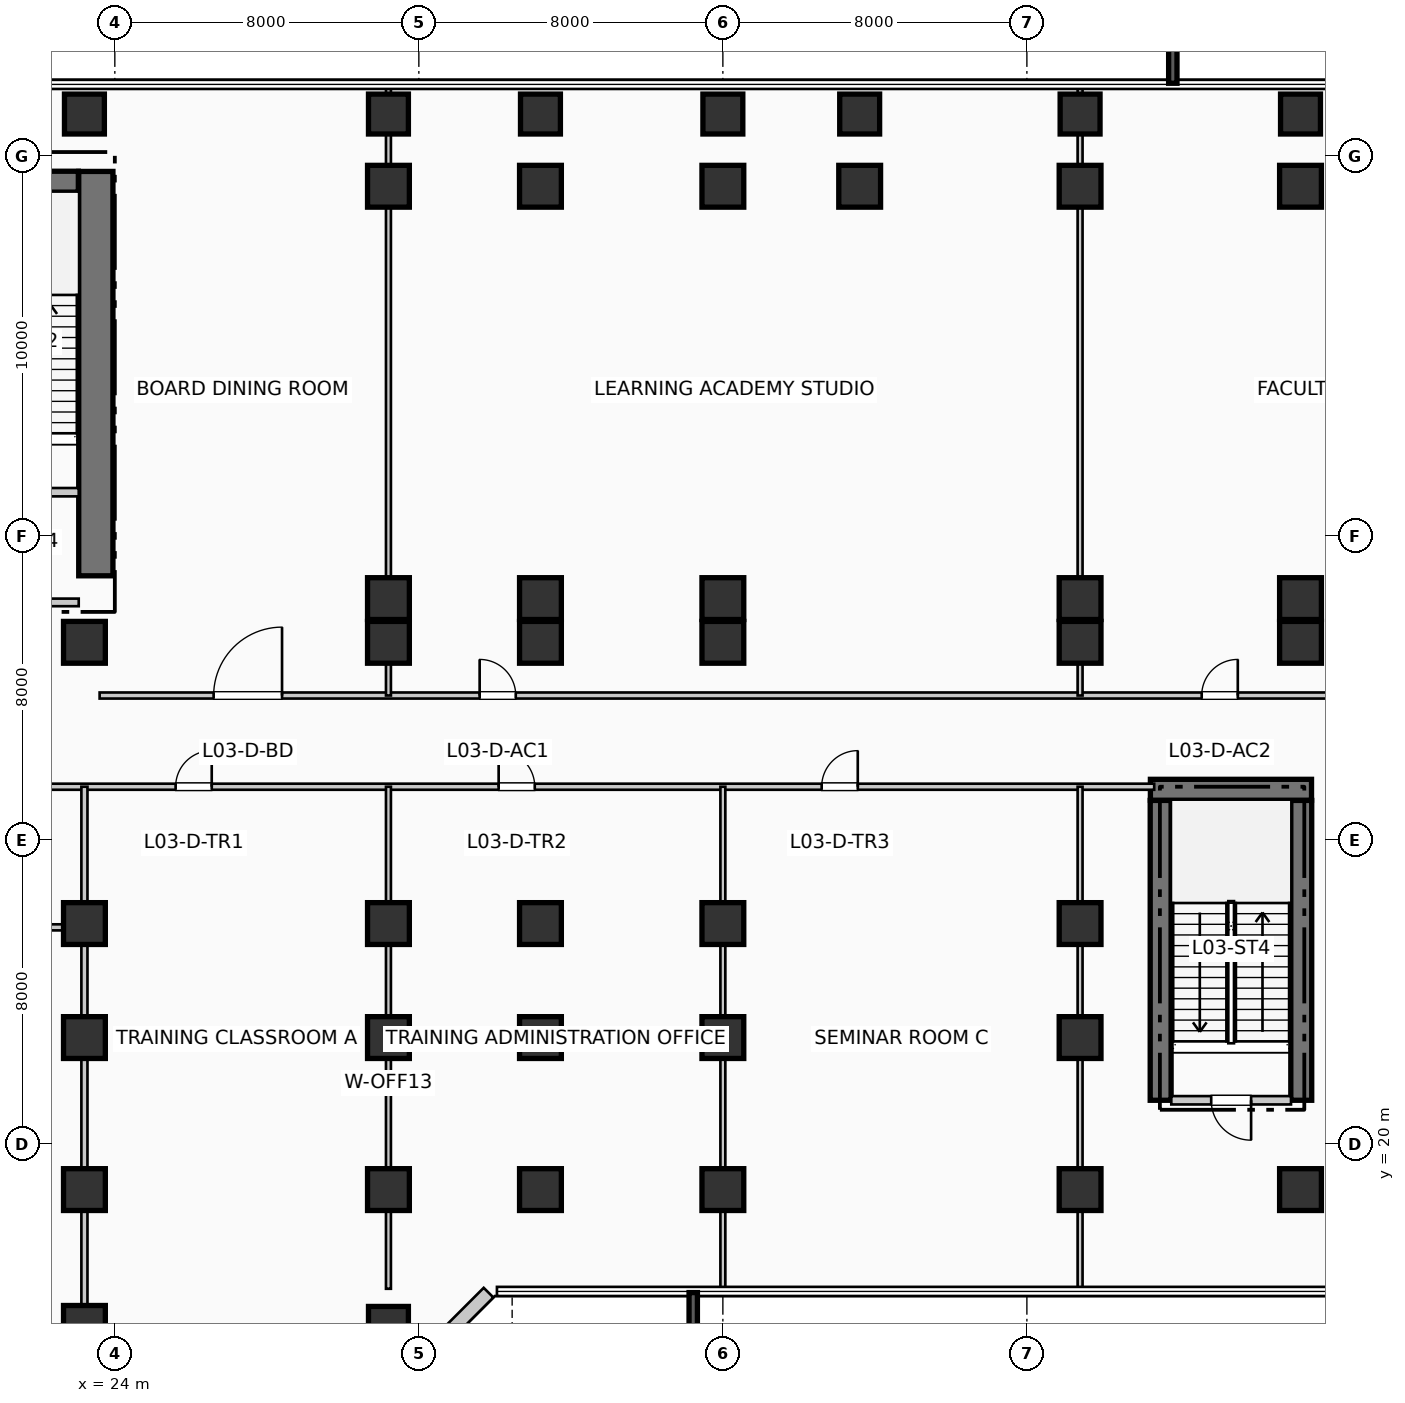
"""IFC4 building model, lengths in metres.
Left out: names, types, materials, properties, quantities, classifications, styles, units other than length and angle.
Written with IfcOpenShell. Run it as: python <this file> out.ifc"""

import sys

from ifc_helpers import new_model, si_unit, direction, frame, frame_2d, origin, origin_2d, place, context, subcontext, project, spatial, rectangle, extrude, element, fill, save


model = new_model("IFC4")
c1 = context("Model", 3, precision=1e-05, world=origin(), true_north=direction((0.0, 1.0)))
c2 = subcontext(c1, "Body", "Model", "MODEL_VIEW")
j1 = project(units=[si_unit("LENGTHUNIT", "METRE"), si_unit("PLANEANGLEUNIT", "RADIAN")], contexts=[c1])
p1 = place(None, origin())
s1 = spatial("IfcSite", under=j1, at=p1, CompositionType="ELEMENT")
p2 = place(p1, origin())
s2 = spatial("IfcBuilding", under=s1, at=p2, CompositionType="ELEMENT")
p3 = place(p2, frame((0.0, 0.0, 16.5)))
s3 = spatial("IfcBuildingStorey", under=s2, at=p3, CompositionType="ELEMENT", Elevation=16.5)
p4 = place(p3, frame((23.5, 34.95, 0.0), z_axis=(0.0, 0.0, 1.0), x_axis=(0.0, 1.0, 0.0)))
e1 = element("IfcWall", 1, at=p4, inside=s3, PredefinedType="SHEAR", context=c2, shape_type="SweptSolid", body=[
    extrude(rectangle(XDim=10.64, YDim=0.9, at=frame_2d((5.32, 0.0))), origin(), (0.0, 0.0, 1.0), 4.62),
])
p5 = place(p3, frame((19.35, 45.32, 0.0), z_axis=(0.0, 0.0, 1.0), x_axis=(1.0, 0.0, 0.0)))
e2 = element("IfcWall", 2, at=p5, inside=s3, PredefinedType="SHEAR", context=c2, shape_type="SweptSolid", body=[
    extrude(rectangle(XDim=3.69, YDim=0.55, at=frame_2d((1.845, 0.0))), origin(), (0.0, 0.0, 1.0), 4.62),
])
for number, where, z_axis, x_axis in (
    (3, (51.52, 21.15, 0.0), (0.0, 0.0, 1.0), (0.0, 1.0, 0.0)),
    (4, (55.22, 21.15, 0.0), (0.0, 0.0, 1.0), (0.0, 1.0, 0.0)),
):
    element("IfcWall", number, at=place(p3, frame(where, z_axis=z_axis, x_axis=x_axis)), inside=s3, PredefinedType="SHEAR", context=c2, shape_type="SweptSolid", body=[
        extrude(rectangle(XDim=7.89, YDim=0.55, at=frame_2d((3.945, 0.0))), origin(), (0.0, 0.0, 1.0), 4.62),
    ])
p6 = place(p3, frame((51.25, 29.32, 0.0), z_axis=(0.0, 0.0, 1.0), x_axis=(1.0, 0.0, 0.0)))
e5 = element("IfcWall", 5, at=p6, inside=s3, PredefinedType="SHEAR", context=c2, shape_type="SweptSolid", body=[
    extrude(rectangle(XDim=4.24, YDim=0.55, at=frame_2d((2.12, 0.0))), origin(), (0.0, 0.0, 1.0), 4.62),
])
for number, where, z_axis, x_axis in (
    (6, (23.2, 15.2, 0.0), (0.0, 0.0, 1.0), (1.0, 0.0, 0.0)),
    (7, (23.2, 18.8, 0.0), (0.0, 0.0, 1.0), (1.0, 0.0, 0.0)),
    (8, (23.2, 22.8, 0.0), (0.0, 0.0, 1.0), (1.0, 0.0, 0.0)),
    (9, (23.2, 25.8, 0.0), (0.0, 0.0, 1.0), (1.0, 0.0, 0.0)),
    (10, (23.2, 33.2, 0.0), (0.0, 0.0, 1.0), (1.0, 0.0, 0.0)),
):
    element("IfcColumn", number, at=place(p3, frame(where, z_axis=z_axis, x_axis=x_axis)), inside=s3, PredefinedType="COLUMN", context=c2, shape_type="SweptSolid", body=[
        extrude(rectangle(XDim=1.1, YDim=1.1, at=origin_2d()), origin(), (0.0, 0.0, 1.0), 4.62),
    ])
for number, where, z_axis, x_axis in (
    (11, (23.2, 47.1, 0.0), (0.0, 0.0, 1.0), (1.0, 0.0, 0.0)),
    (12, (31.2, 15.2, 0.0), (0.0, 0.0, 1.0), (1.0, 0.0, 0.0)),
):
    element("IfcColumn", number, at=place(p3, frame(where, z_axis=z_axis, x_axis=x_axis)), inside=s3, PredefinedType="COLUMN", context=c2, shape_type="SweptSolid", body=[
        extrude(rectangle(XDim=1.05, YDim=1.05, at=origin_2d()), origin(), (0.0, 0.0, 1.0), 4.62),
    ])
for number, where, z_axis, x_axis in (
    (13, (31.2, 18.8, 0.0), (0.0, 0.0, 1.0), (1.0, 0.0, 0.0)),
    (14, (31.2, 22.8, 0.0), (0.0, 0.0, 1.0), (1.0, 0.0, 0.0)),
    (15, (31.2, 25.8, 0.0), (0.0, 0.0, 1.0), (1.0, 0.0, 0.0)),
    (16, (31.2, 33.2, 0.0), (0.0, 0.0, 1.0), (1.0, 0.0, 0.0)),
    (17, (31.2, 34.35, 0.0), (0.0, 0.0, 1.0), (1.0, 0.0, 0.0)),
    (18, (31.2, 45.2, 0.0), (0.0, 0.0, 1.0), (1.0, 0.0, 0.0)),
):
    element("IfcColumn", number, at=place(p3, frame(where, z_axis=z_axis, x_axis=x_axis)), inside=s3, PredefinedType="COLUMN", context=c2, shape_type="SweptSolid", body=[
        extrude(rectangle(XDim=1.1, YDim=1.1, at=origin_2d()), origin(), (0.0, 0.0, 1.0), 4.62),
    ])
p7 = place(p3, frame((31.2, 47.1, 0.0), z_axis=(0.0, 0.0, 1.0), x_axis=(1.0, 0.0, 0.0)))
e19 = element("IfcColumn", 19, at=p7, inside=s3, PredefinedType="COLUMN", context=c2, shape_type="SweptSolid", body=[
    extrude(rectangle(XDim=1.05, YDim=1.05, at=origin_2d()), origin(), (0.0, 0.0, 1.0), 4.62),
])
for number, where, z_axis, x_axis in (
    (20, (35.2, 18.8, 0.0), (0.0, 0.0, 1.0), (1.0, 0.0, 0.0)),
    (21, (35.2, 22.8, 0.0), (0.0, 0.0, 1.0), (1.0, 0.0, 0.0)),
    (22, (35.2, 25.8, 0.0), (0.0, 0.0, 1.0), (1.0, 0.0, 0.0)),
    (23, (35.2, 33.2, 0.0), (0.0, 0.0, 1.0), (1.0, 0.0, 0.0)),
    (24, (35.2, 34.35, 0.0), (0.0, 0.0, 1.0), (1.0, 0.0, 0.0)),
    (25, (35.2, 45.2, 0.0), (0.0, 0.0, 1.0), (1.0, 0.0, 0.0)),
):
    element("IfcColumn", number, at=place(p3, frame(where, z_axis=z_axis, x_axis=x_axis)), inside=s3, PredefinedType="COLUMN", context=c2, shape_type="SweptSolid", body=[
        extrude(rectangle(XDim=1.1, YDim=1.1, at=origin_2d()), origin(), (0.0, 0.0, 1.0), 4.62),
    ])
p8 = place(p3, frame((35.2, 47.1, 0.0), z_axis=(0.0, 0.0, 1.0), x_axis=(1.0, 0.0, 0.0)))
e26 = element("IfcColumn", 26, at=p8, inside=s3, PredefinedType="COLUMN", context=c2, shape_type="SweptSolid", body=[
    extrude(rectangle(XDim=1.05, YDim=1.05, at=origin_2d()), origin(), (0.0, 0.0, 1.0), 4.62),
])
for number, where, z_axis, x_axis in (
    (27, (40.0, 18.8, 0.0), (0.0, 0.0, 1.0), (1.0, 0.0, 0.0)),
    (28, (40.0, 22.8, 0.0), (0.0, 0.0, 1.0), (1.0, 0.0, 0.0)),
    (29, (40.0, 25.8, 0.0), (0.0, 0.0, 1.0), (1.0, 0.0, 0.0)),
    (30, (40.0, 33.2, 0.0), (0.0, 0.0, 1.0), (1.0, 0.0, 0.0)),
    (31, (40.0, 34.35, 0.0), (0.0, 0.0, 1.0), (1.0, 0.0, 0.0)),
    (32, (40.0, 45.2, 0.0), (0.0, 0.0, 1.0), (1.0, 0.0, 0.0)),
):
    element("IfcColumn", number, at=place(p3, frame(where, z_axis=z_axis, x_axis=x_axis)), inside=s3, PredefinedType="COLUMN", context=c2, shape_type="SweptSolid", body=[
        extrude(rectangle(XDim=1.1, YDim=1.1, at=origin_2d()), origin(), (0.0, 0.0, 1.0), 4.62),
    ])
p9 = place(p3, frame((40.0, 47.1, 0.0), z_axis=(0.0, 0.0, 1.0), x_axis=(1.0, 0.0, 0.0)))
e33 = element("IfcColumn", 33, at=p9, inside=s3, PredefinedType="COLUMN", context=c2, shape_type="SweptSolid", body=[
    extrude(rectangle(XDim=1.05, YDim=1.05, at=origin_2d()), origin(), (0.0, 0.0, 1.0), 4.62),
])
p10 = place(p3, frame((43.6, 45.2, 0.0), z_axis=(0.0, 0.0, 1.0), x_axis=(1.0, 0.0, 0.0)))
e34 = element("IfcColumn", 34, at=p10, inside=s3, PredefinedType="COLUMN", context=c2, shape_type="SweptSolid", body=[
    extrude(rectangle(XDim=1.1, YDim=1.1, at=origin_2d()), origin(), (0.0, 0.0, 1.0), 4.62),
])
p11 = place(p3, frame((43.6, 47.1, 0.0), z_axis=(0.0, 0.0, 1.0), x_axis=(1.0, 0.0, 0.0)))
e35 = element("IfcColumn", 35, at=p11, inside=s3, PredefinedType="COLUMN", context=c2, shape_type="SweptSolid", body=[
    extrude(rectangle(XDim=1.05, YDim=1.05, at=origin_2d()), origin(), (0.0, 0.0, 1.0), 4.62),
])
for number, where, z_axis, x_axis in (
    (36, (49.4, 18.8, 0.0), (0.0, 0.0, 1.0), (1.0, 0.0, 0.0)),
    (37, (49.4, 22.8, 0.0), (0.0, 0.0, 1.0), (1.0, 0.0, 0.0)),
    (38, (49.4, 25.8, 0.0), (0.0, 0.0, 1.0), (1.0, 0.0, 0.0)),
    (39, (49.4, 33.2, 0.0), (0.0, 0.0, 1.0), (1.0, 0.0, 0.0)),
    (40, (49.4, 34.35, 0.0), (0.0, 0.0, 1.0), (1.0, 0.0, 0.0)),
    (41, (49.4, 45.2, 0.0), (0.0, 0.0, 1.0), (1.0, 0.0, 0.0)),
):
    element("IfcColumn", number, at=place(p3, frame(where, z_axis=z_axis, x_axis=x_axis)), inside=s3, PredefinedType="COLUMN", context=c2, shape_type="SweptSolid", body=[
        extrude(rectangle(XDim=1.1, YDim=1.1, at=origin_2d()), origin(), (0.0, 0.0, 1.0), 4.62),
    ])
p12 = place(p3, frame((49.4, 47.1, 0.0), z_axis=(0.0, 0.0, 1.0), x_axis=(1.0, 0.0, 0.0)))
e42 = element("IfcColumn", 42, at=p12, inside=s3, PredefinedType="COLUMN", context=c2, shape_type="SweptSolid", body=[
    extrude(rectangle(XDim=1.05, YDim=1.05, at=origin_2d()), origin(), (0.0, 0.0, 1.0), 4.62),
])
for number, where, z_axis, x_axis in (
    (43, (55.2, 18.8, 0.0), (0.0, 0.0, 1.0), (1.0, 0.0, 0.0)),
    (44, (55.2, 33.2, 0.0), (0.0, 0.0, 1.0), (1.0, 0.0, 0.0)),
    (45, (55.2, 34.35, 0.0), (0.0, 0.0, 1.0), (1.0, 0.0, 0.0)),
    (46, (55.2, 45.2, 0.0), (0.0, 0.0, 1.0), (1.0, 0.0, 0.0)),
):
    element("IfcColumn", number, at=place(p3, frame(where, z_axis=z_axis, x_axis=x_axis)), inside=s3, PredefinedType="COLUMN", context=c2, shape_type="SweptSolid", body=[
        extrude(rectangle(XDim=1.1, YDim=1.1, at=origin_2d()), origin(), (0.0, 0.0, 1.0), 4.62),
    ])
p13 = place(p3, frame((55.2, 47.1, 0.0), z_axis=(0.0, 0.0, 1.0), x_axis=(1.0, 0.0, 0.0)))
e47 = element("IfcColumn", 47, at=p13, inside=s3, PredefinedType="COLUMN", context=c2, shape_type="SweptSolid", body=[
    extrude(rectangle(XDim=1.05, YDim=1.05, at=origin_2d()), origin(), (0.0, 0.0, 1.0), 4.62),
])
p14 = place(p3, frame((31.912, 14.166, 0.0), z_axis=(0.0, 0.0, 1.0), x_axis=(0.707106781187, 0.707106781187, 0.0)))
e48 = element("IfcWall", 48, at=p14, inside=s3, PredefinedType="SOLIDWALL", context=c2, shape_type="SweptSolid", body=[
    extrude(rectangle(XDim=2.718, YDim=0.36, at=frame_2d((1.359, 0.0))), origin(), (0.0, 0.0, 1.0), 4.3),
])
p15 = place(p3, frame((19.9, 37.15, 0.0), z_axis=(0.0, 0.0, 1.0), x_axis=(1.0, 0.0, 0.0)))
e49 = element("IfcWall", 49, at=p15, inside=s3, PredefinedType="PARTITIONING", context=c2, shape_type="SweptSolid", body=[
    extrude(rectangle(XDim=3.15, YDim=0.22, at=frame_2d((1.575, 0.0))), origin(), (0.0, 0.0, 1.0), 4.3),
])
p16 = place(p15, frame((2.05, 0.0, 0.0), z_axis=(0.0, 0.0, 1.0), x_axis=(-1.0, 0.0, 0.0)))
e50 = element("IfcOpeningElement", 50, at=p16, cuts=e49, PredefinedType="OPENING", context=c2, shape_type="SweptSolid", body=[
    extrude(rectangle(XDim=1.05, YDim=2.15, at=frame_2d((0.525, 1.075))), frame((0.0, 0.12, 0.0), z_axis=(0.0, -1.0, 0.0), x_axis=(1.0, 0.0, 0.0)), (0.0, 0.0, 1.0), 0.24),
])
p17 = place(p3, frame((19.8, 34.25, 0.0), z_axis=(0.0, 0.0, 1.0), x_axis=(1.0, 0.0, 0.0)))
e51 = element("IfcWall", 51, at=p17, inside=s3, PredefinedType="PARTITIONING", context=c2, shape_type="SweptSolid", body=[
    extrude(rectangle(XDim=3.25, YDim=0.2, at=frame_2d((1.625, 0.0))), origin(), (0.0, 0.0, 1.0), 4.3),
])
p18 = place(p17, frame((2.15, 0.0, 0.0), z_axis=(0.0, 0.0, 1.0), x_axis=(-1.0, 0.0, 0.0)))
e52 = element("IfcOpeningElement", 52, at=p18, cuts=e51, PredefinedType="OPENING", context=c2, shape_type="SweptSolid", body=[
    extrude(rectangle(XDim=1.1, YDim=2.15, at=frame_2d((0.55, 1.075))), frame((0.0, 0.11, 0.0), z_axis=(0.0, -1.0, 0.0), x_axis=(1.0, 0.0, 0.0)), (0.0, 0.0, 1.0), 0.22),
])
p19 = place(p3, frame((51.8, 21.15, 0.0), z_axis=(0.0, 0.0, 1.0), x_axis=(1.0, 0.0, 0.0)))
e53 = element("IfcWall", 53, at=p19, inside=s3, PredefinedType="PARTITIONING", context=c2, shape_type="SweptSolid", body=[
    extrude(rectangle(XDim=3.15, YDim=0.22, at=frame_2d((1.575, 0.0))), origin(), (0.0, 0.0, 1.0), 4.3),
])
p20 = place(p19, frame((2.1, 0.0, 0.0), z_axis=(0.0, 0.0, 1.0), x_axis=(-1.0, 0.0, 0.0)))
e54 = element("IfcOpeningElement", 54, at=p20, cuts=e53, PredefinedType="OPENING", context=c2, shape_type="SweptSolid", body=[
    extrude(rectangle(XDim=1.05, YDim=2.15, at=frame_2d((0.525, 1.075))), frame((0.0, 0.12, 0.0), z_axis=(0.0, -1.0, 0.0), x_axis=(1.0, 0.0, 0.0)), (0.0, 0.0, 1.0), 0.24),
])
p21 = place(p3, frame((7.6, 29.4, 0.0), z_axis=(0.0, 0.0, 1.0), x_axis=(1.0, 0.0, 0.0)))
e55 = element("IfcWall", 55, at=p21, inside=s3, PredefinedType="PARTITIONING", context=c2, shape_type="SweptSolid", body=[
    extrude(rectangle(XDim=43.75, YDim=0.16, at=frame_2d((21.875, 0.0))), origin(), (0.0, 0.0, 1.0), 3.955),
])
p22 = place(p21, frame((5.0, 0.0, 0.0)))
e56 = element("IfcOpeningElement", 56, at=p22, cuts=e55, PredefinedType="OPENING", context=c2, shape_type="SweptSolid", body=[
    extrude(rectangle(XDim=0.95, YDim=2.15, at=frame_2d((0.475, 1.075))), frame((0.0, 0.09, 0.0), z_axis=(0.0, -1.0, 0.0), x_axis=(1.0, 0.0, 0.0)), (0.0, 0.0, 1.0), 0.18),
])
p23 = place(p21, frame((18.0, 0.0, 0.0)))
e57 = element("IfcOpeningElement", 57, at=p23, cuts=e55, PredefinedType="OPENING", context=c2, shape_type="SweptSolid", body=[
    extrude(rectangle(XDim=0.95, YDim=2.15, at=frame_2d((0.475, 1.075))), frame((0.0, 0.09, 0.0), z_axis=(0.0, -1.0, 0.0), x_axis=(1.0, 0.0, 0.0)), (0.0, 0.0, 1.0), 0.18),
])
p24 = place(p21, frame((26.5, 0.0, 0.0)))
e58 = element("IfcOpeningElement", 58, at=p24, cuts=e55, PredefinedType="OPENING", context=c2, shape_type="SweptSolid", body=[
    extrude(rectangle(XDim=0.95, YDim=2.15, at=frame_2d((0.475, 1.075))), frame((0.0, 0.09, 0.0), z_axis=(0.0, -1.0, 0.0), x_axis=(1.0, 0.0, 0.0)), (0.0, 0.0, 1.0), 0.18),
])
p25 = place(p21, frame((35.0, 0.0, 0.0)))
e59 = element("IfcOpeningElement", 59, at=p25, cuts=e55, PredefinedType="OPENING", context=c2, shape_type="SweptSolid", body=[
    extrude(rectangle(XDim=0.95, YDim=2.15, at=frame_2d((0.475, 1.075))), frame((0.0, 0.09, 0.0), z_axis=(0.0, -1.0, 0.0), x_axis=(1.0, 0.0, 0.0)), (0.0, 0.0, 1.0), 0.18),
])
p26 = place(p3, frame((7.6, 25.7, 0.0), z_axis=(0.0, 0.0, 1.0), x_axis=(1.0, 0.0, 0.0)))
e60 = element("IfcWall", 60, at=p26, inside=s3, PredefinedType="PARTITIONING", context=c2, shape_type="SweptSolid", body=[
    extrude(rectangle(XDim=15.6, YDim=0.16, at=frame_2d((7.8, 0.0))), origin(), (0.0, 0.0, 1.0), 3.485),
])
p27 = place(p3, frame((23.2, -1.81, 0.0), z_axis=(0.0, 0.0, 1.0), x_axis=(0.0, 1.0, 0.0)))
e61 = element("IfcWall", 61, at=p27, inside=s3, PredefinedType="PARTITIONING", context=c2, shape_type="SweptSolid", body=[
    extrude(rectangle(XDim=31.21, YDim=0.16, at=frame_2d((15.605, 0.0))), origin(), (0.0, 0.0, 1.0), 3.485),
])
for number, where, z_axis, x_axis in (
    (62, (31.2, 16.19, 0.0), (0.0, 0.0, 1.0), (0.0, 1.0, 0.0)),
    (63, (40.0, 16.19, 0.0), (0.0, 0.0, 1.0), (0.0, 1.0, 0.0)),
    (64, (49.4, 16.19, 0.0), (0.0, 0.0, 1.0), (0.0, 1.0, 0.0)),
):
    element("IfcWall", number, at=place(p3, frame(where, z_axis=z_axis, x_axis=x_axis)), inside=s3, PredefinedType="PARTITIONING", context=c2, shape_type="SweptSolid", body=[
        extrude(rectangle(XDim=13.21, YDim=0.13, at=frame_2d((6.605, 0.0))), origin(), (0.0, 0.0, 1.0), 3.485),
    ])
p28 = place(p3, frame((23.6, 31.8, 0.0), z_axis=(0.0, 0.0, 1.0), x_axis=(1.0, 0.0, 0.0)))
e65 = element("IfcWall", 65, at=p28, inside=s3, PredefinedType="PARTITIONING", context=c2, shape_type="SweptSolid", body=[
    extrude(rectangle(XDim=42.21, YDim=0.16, at=frame_2d((21.105, 0.0))), origin(), (0.0, 0.0, 1.0), 4.3),
])
p29 = place(p28, frame((3.0, 0.0, 0.0)))
e66 = element("IfcOpeningElement", 66, at=p29, cuts=e65, PredefinedType="OPENING", context=c2, shape_type="SweptSolid", body=[
    extrude(rectangle(XDim=1.8, YDim=2.3, at=frame_2d((0.9, 1.15))), frame((0.0, 0.09, 0.0), z_axis=(0.0, -1.0, 0.0), x_axis=(1.0, 0.0, 0.0)), (0.0, 0.0, 1.0), 0.18),
])
p30 = place(p28, frame((10.0, 0.0, 0.0)))
e67 = element("IfcOpeningElement", 67, at=p30, cuts=e65, PredefinedType="OPENING", context=c2, shape_type="SweptSolid", body=[
    extrude(rectangle(XDim=0.95, YDim=2.15, at=frame_2d((0.475, 1.075))), frame((0.0, 0.09, 0.0), z_axis=(0.0, -1.0, 0.0), x_axis=(1.0, 0.0, 0.0)), (0.0, 0.0, 1.0), 0.18),
])
p31 = place(p28, frame((29.0, 0.0, 0.0)))
e68 = element("IfcOpeningElement", 68, at=p31, cuts=e65, PredefinedType="OPENING", context=c2, shape_type="SweptSolid", body=[
    extrude(rectangle(XDim=0.95, YDim=2.15, at=frame_2d((0.475, 1.075))), frame((0.0, 0.09, 0.0), z_axis=(0.0, -1.0, 0.0), x_axis=(1.0, 0.0, 0.0)), (0.0, 0.0, 1.0), 0.18),
])
for number, where, z_axis, x_axis in (
    (69, (31.2, 31.8, 0.0), (0.0, 0.0, 1.0), (0.0, 1.0, 0.0)),
    (70, (49.4, 31.8, 0.0), (0.0, 0.0, 1.0), (0.0, 1.0, 0.0)),
):
    element("IfcWall", number, at=place(p3, frame(where, z_axis=z_axis, x_axis=x_axis)), inside=s3, PredefinedType="PARTITIONING", context=c2, shape_type="SweptSolid", body=[
        extrude(rectangle(XDim=16.01, YDim=0.13, at=frame_2d((8.005, 0.0))), origin(), (0.0, 0.0, 1.0), 3.485),
    ])
p32 = place(p20, origin())
e71 = element("IfcDoor", 71, at=p32, inside=s3, OperationType="SINGLE_SWING_RIGHT", PredefinedType="DOOR", context=c2, shape_type="SweptSolid", body=[
    extrude(rectangle(XDim=1.05, YDim=2.15, at=frame_2d((0.525, 1.075))), frame((0.0, 0.025, 0.0), z_axis=(0.0, -1.0, 0.0), x_axis=(1.0, 0.0, 0.0)), (0.0, 0.0, 1.0), 0.05),
])
fill(e54, e71)
p33 = place(p23, origin())
e72 = element("IfcDoor", 72, at=p33, inside=s3, OperationType="SINGLE_SWING_RIGHT", PredefinedType="DOOR", context=c2, shape_type="SweptSolid", body=[
    extrude(rectangle(XDim=0.95, YDim=2.15, at=frame_2d((0.475, 1.075))), frame((0.0, 0.025, 0.0), z_axis=(0.0, -1.0, 0.0), x_axis=(1.0, 0.0, 0.0)), (0.0, 0.0, 1.0), 0.05),
])
fill(e57, e72)
p34 = place(p24, origin())
e73 = element("IfcDoor", 73, at=p34, inside=s3, OperationType="SINGLE_SWING_LEFT", PredefinedType="DOOR", context=c2, shape_type="SweptSolid", body=[
    extrude(rectangle(XDim=0.95, YDim=2.15, at=frame_2d((0.475, 1.075))), frame((0.0, 0.025, 0.0), z_axis=(0.0, -1.0, 0.0), x_axis=(1.0, 0.0, 0.0)), (0.0, 0.0, 1.0), 0.05),
])
fill(e58, e73)
p35 = place(p25, origin())
e74 = element("IfcDoor", 74, at=p35, inside=s3, OperationType="SINGLE_SWING_RIGHT", PredefinedType="DOOR", context=c2, shape_type="SweptSolid", body=[
    extrude(rectangle(XDim=0.95, YDim=2.15, at=frame_2d((0.475, 1.075))), frame((0.0, 0.025, 0.0), z_axis=(0.0, -1.0, 0.0), x_axis=(1.0, 0.0, 0.0)), (0.0, 0.0, 1.0), 0.05),
])
fill(e59, e74)
p36 = place(p29, origin())
e75 = element("IfcDoor", 75, at=p36, inside=s3, OperationType="SINGLE_SWING_RIGHT", PredefinedType="DOOR", context=c2, shape_type="SweptSolid", body=[
    extrude(rectangle(XDim=1.8, YDim=2.3, at=frame_2d((0.9, 1.15))), frame((0.0, 0.025, 0.0), z_axis=(0.0, -1.0, 0.0), x_axis=(1.0, 0.0, 0.0)), (0.0, 0.0, 1.0), 0.05),
])
fill(e66, e75)
p37 = place(p30, origin())
e76 = element("IfcDoor", 76, at=p37, inside=s3, OperationType="SINGLE_SWING_LEFT", PredefinedType="DOOR", context=c2, shape_type="SweptSolid", body=[
    extrude(rectangle(XDim=0.95, YDim=2.15, at=frame_2d((0.475, 1.075))), frame((0.0, 0.025, 0.0), z_axis=(0.0, -1.0, 0.0), x_axis=(1.0, 0.0, 0.0)), (0.0, 0.0, 1.0), 0.05),
])
fill(e67, e76)
p38 = place(p31, origin())
e77 = element("IfcDoor", 77, at=p38, inside=s3, OperationType="SINGLE_SWING_RIGHT", PredefinedType="DOOR", context=c2, shape_type="SweptSolid", body=[
    extrude(rectangle(XDim=0.95, YDim=2.15, at=frame_2d((0.475, 1.075))), frame((0.0, 0.025, 0.0), z_axis=(0.0, -1.0, 0.0), x_axis=(1.0, 0.0, 0.0)), (0.0, 0.0, 1.0), 0.05),
])
fill(e68, e77)
save(model, sys.argv[1])
